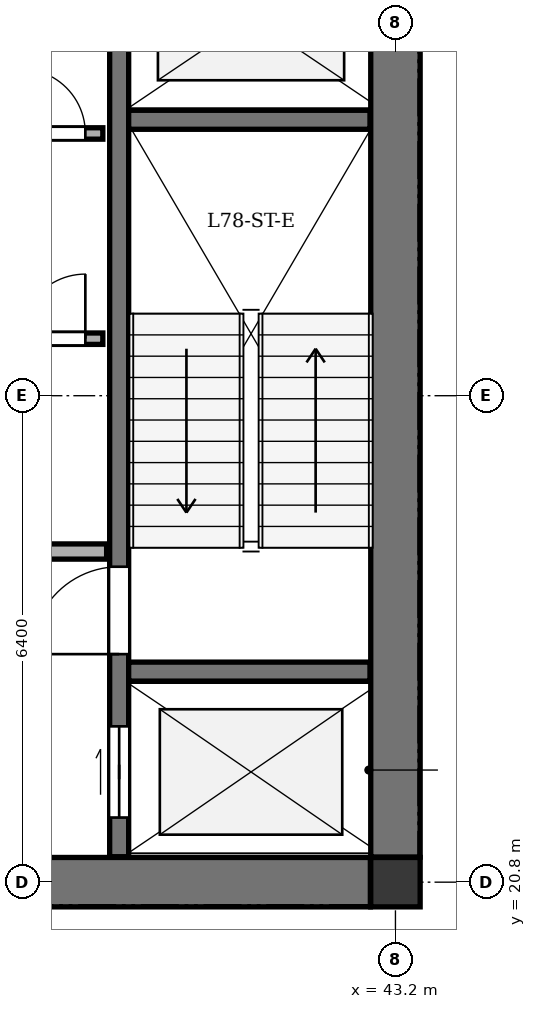
"""IFC4 building model, lengths in metres.
Left out: names, types, materials, properties, quantities, classifications, styles, units other than length and angle.
Written with IfcOpenShell. Run it as: python <this file> out.ifc"""

import sys

from ifc_helpers import new_model, si_unit, direction, frame, frame_2d, origin, origin_2d, place, context, subcontext, project, spatial, rectangle, extrude, element, fill, save


model = new_model("IFC4")
c1 = context("Model", 3, precision=1e-05, world=origin(), true_north=direction((0.0, 1.0)))
c2 = subcontext(c1, "Body", "Model", "MODEL_VIEW")
j1 = project(units=[si_unit("LENGTHUNIT", "METRE"), si_unit("PLANEANGLEUNIT", "RADIAN")], contexts=[c1])
p1 = place(None, origin())
s1 = spatial("IfcSite", under=j1, at=p1, CompositionType="ELEMENT")
p2 = place(p1, origin())
s2 = spatial("IfcBuilding", under=s1, at=p2, CompositionType="ELEMENT")
p3 = place(p2, frame((0.0, 0.0, 296.4)))
s3 = spatial("IfcBuildingStorey", under=s2, at=p3, CompositionType="ELEMENT", Elevation=296.4)
p4 = place(p3, frame((43.2, 20.8, 0.0), z_axis=(0.0, 0.0, 1.0), x_axis=(1.0, 0.0, 0.0)))
e1 = element("IfcColumn", 1, at=p4, inside=s3, PredefinedType="COLUMN", context=c2, shape_type="SweptSolid", body=[
    extrude(rectangle(XDim=0.65, YDim=0.65, at=origin_2d()), origin(), (0.0, 0.0, 1.0), 4.2),
])
p5 = place(p3, frame((43.2, 21.13, 0.0), z_axis=(0.0, 0.0, 1.0), x_axis=(0.0, 1.0, 0.0)))
e2 = element("IfcWall", 2, at=p5, inside=s3, PredefinedType="SHEAR", context=c2, shape_type="SweptSolid", body=[
    extrude(rectangle(XDim=12.14, YDim=0.65, at=frame_2d((6.07, 0.0))), origin(), (0.0, 0.0, 1.0), 3.92),
])
p6 = place(p3, frame((35.53, 20.8, 0.0), z_axis=(0.0, 0.0, 1.0), x_axis=(1.0, 0.0, 0.0)))
e3 = element("IfcWall", 3, at=p6, inside=s3, PredefinedType="SHEAR", context=c2, shape_type="SweptSolid", body=[
    extrude(rectangle(XDim=7.34, YDim=0.65, at=frame_2d((3.67, 0.0))), origin(), (0.0, 0.0, 1.0), 3.92),
])
p7 = place(p3, frame((39.565, 21.135, 0.0), z_axis=(0.0, 0.0, 1.0), x_axis=(0.0, 1.0, 0.0)))
e4 = element("IfcWall", 4, at=p7, inside=s3, PredefinedType="SHEAR", context=c2, shape_type="SweptSolid", body=[
    extrude(rectangle(XDim=12.13, YDim=0.25, at=frame_2d((6.065, 0.0))), origin(), (0.0, 0.0, 1.0), 3.92),
])
p8 = place(p7, frame((0.515, 0.0, 0.0)))
e5 = element("IfcOpeningElement", 5, at=p8, cuts=e4, PredefinedType="OPENING", context=c2, shape_type="SweptSolid", body=[
    extrude(rectangle(XDim=1.2, YDim=2.15, at=frame_2d((0.6, 1.075))), frame((0.0, 0.135, 0.0), z_axis=(0.0, -1.0, 0.0), x_axis=(1.0, 0.0, 0.0)), (0.0, 0.0, 1.0), 0.27),
])
p9 = place(p7, frame((2.665, 0.0, 0.0)))
e6 = element("IfcOpeningElement", 6, at=p9, cuts=e4, PredefinedType="OPENING", context=c2, shape_type="SweptSolid", body=[
    extrude(rectangle(XDim=1.15, YDim=2.15, at=frame_2d((0.575, 1.075))), frame((0.0, 0.135, 0.0), z_axis=(0.0, -1.0, 0.0), x_axis=(1.0, 0.0, 0.0)), (0.0, 0.0, 1.0), 0.27),
])
for number, where, z_axis, x_axis in (
    (7, (39.69, 23.57, 0.0), (0.0, 0.0, 1.0), (1.0, 0.0, 0.0)),
    (8, (39.69, 30.83, 0.0), (0.0, 0.0, 1.0), (1.0, 0.0, 0.0)),
):
    element("IfcWall", number, at=place(p3, frame(where, z_axis=z_axis, x_axis=x_axis)), inside=s3, PredefinedType="SHEAR", context=c2, shape_type="SweptSolid", body=[
        extrude(rectangle(XDim=3.175, YDim=0.25, at=frame_2d((1.587, 0.0))), origin(), (0.0, 0.0, 1.0), 3.92),
    ])
p10 = place(p3, frame((35.55, 25.15, 0.0), z_axis=(0.0, 0.0, 1.0), x_axis=(1.0, 0.0, 0.0)))
e9 = element("IfcWall", 9, at=p10, inside=s3, PredefinedType="SOLIDWALL", context=c2, shape_type="SweptSolid", body=[
    extrude(rectangle(XDim=3.85, YDim=0.2, at=frame_2d((1.925, 0.0))), origin(), (0.0, 0.0, 1.0), 3.92),
])
p11 = place(p3, frame((38.05, 27.95, 0.0), z_axis=(0.0, 0.0, 1.0), x_axis=(1.0, 0.0, 0.0)))
e10 = element("IfcWall", 10, at=p11, inside=s3, PredefinedType="PARTITIONING", context=c2, shape_type="SweptSolid", body=[
    extrude(rectangle(XDim=1.3, YDim=0.15, at=frame_2d((0.65, 0.0))), origin(), (0.0, 0.0, 1.0), 3.92),
])
p12 = place(p11, frame((0.22, 0.0, 0.0)))
e11 = element("IfcOpeningElement", 11, at=p12, cuts=e10, PredefinedType="OPENING", context=c2, shape_type="SweptSolid", body=[
    extrude(rectangle(XDim=0.85, YDim=2.02, at=frame_2d((0.425, 1.01))), frame((0.0, 0.085, 0.0), z_axis=(0.0, -1.0, 0.0), x_axis=(1.0, 0.0, 0.0)), (0.0, 0.0, 1.0), 0.17),
])
p13 = place(p3, frame((38.05, 30.65, 0.0), z_axis=(0.0, 0.0, 1.0), x_axis=(1.0, 0.0, 0.0)))
e12 = element("IfcWall", 12, at=p13, inside=s3, PredefinedType="PARTITIONING", context=c2, shape_type="SweptSolid", body=[
    extrude(rectangle(XDim=1.3, YDim=0.15, at=frame_2d((0.65, 0.0))), origin(), (0.0, 0.0, 1.0), 3.92),
])
p14 = place(p13, frame((0.22, 0.0, 0.0)))
e13 = element("IfcOpeningElement", 13, at=p14, cuts=e12, PredefinedType="OPENING", context=c2, shape_type="SweptSolid", body=[
    extrude(rectangle(XDim=0.85, YDim=2.02, at=frame_2d((0.425, 1.01))), frame((0.0, 0.085, 0.0), z_axis=(0.0, -1.0, 0.0), x_axis=(1.0, 0.0, 0.0)), (0.0, 0.0, 1.0), 0.17),
])
p15 = place(p8, origin())
e14 = element("IfcDoor", 14, at=p15, inside=s3, OperationType="DOUBLE_DOOR_SLIDING", PredefinedType="DOOR", context=c2, shape_type="SweptSolid", body=[
    extrude(rectangle(XDim=1.2, YDim=2.15, at=frame_2d((0.6, 1.075))), frame((0.0, 0.025, 0.0), z_axis=(0.0, -1.0, 0.0), x_axis=(1.0, 0.0, 0.0)), (0.0, 0.0, 1.0), 0.05),
])
fill(e5, e14)
p16 = place(p9, origin())
e15 = element("IfcDoor", 15, at=p16, inside=s3, OperationType="SINGLE_SWING_LEFT", PredefinedType="DOOR", context=c2, shape_type="SweptSolid", body=[
    extrude(rectangle(XDim=1.15, YDim=2.15, at=frame_2d((0.575, 1.075))), frame((0.0, 0.025, 0.0), z_axis=(0.0, -1.0, 0.0), x_axis=(1.0, 0.0, 0.0)), (0.0, 0.0, 1.0), 0.05),
])
fill(e6, e15)
p17 = place(p12, origin())
e16 = element("IfcDoor", 16, at=p17, inside=s3, OperationType="SINGLE_SWING_RIGHT", PredefinedType="DOOR", context=c2, shape_type="SweptSolid", body=[
    extrude(rectangle(XDim=0.85, YDim=2.02, at=frame_2d((0.425, 1.01))), frame((0.0, 0.025, 0.0), z_axis=(0.0, -1.0, 0.0), x_axis=(1.0, 0.0, 0.0)), (0.0, 0.0, 1.0), 0.05),
])
fill(e11, e16)
p18 = place(p14, origin())
e17 = element("IfcDoor", 17, at=p18, inside=s3, OperationType="SINGLE_SWING_LEFT", PredefinedType="DOOR", context=c2, shape_type="SweptSolid", body=[
    extrude(rectangle(XDim=0.85, YDim=2.02, at=frame_2d((0.425, 1.01))), frame((0.0, 0.025, 0.0), z_axis=(0.0, -1.0, 0.0), x_axis=(1.0, 0.0, 0.0)), (0.0, 0.0, 1.0), 0.05),
])
fill(e13, e17)
save(model, sys.argv[1])
